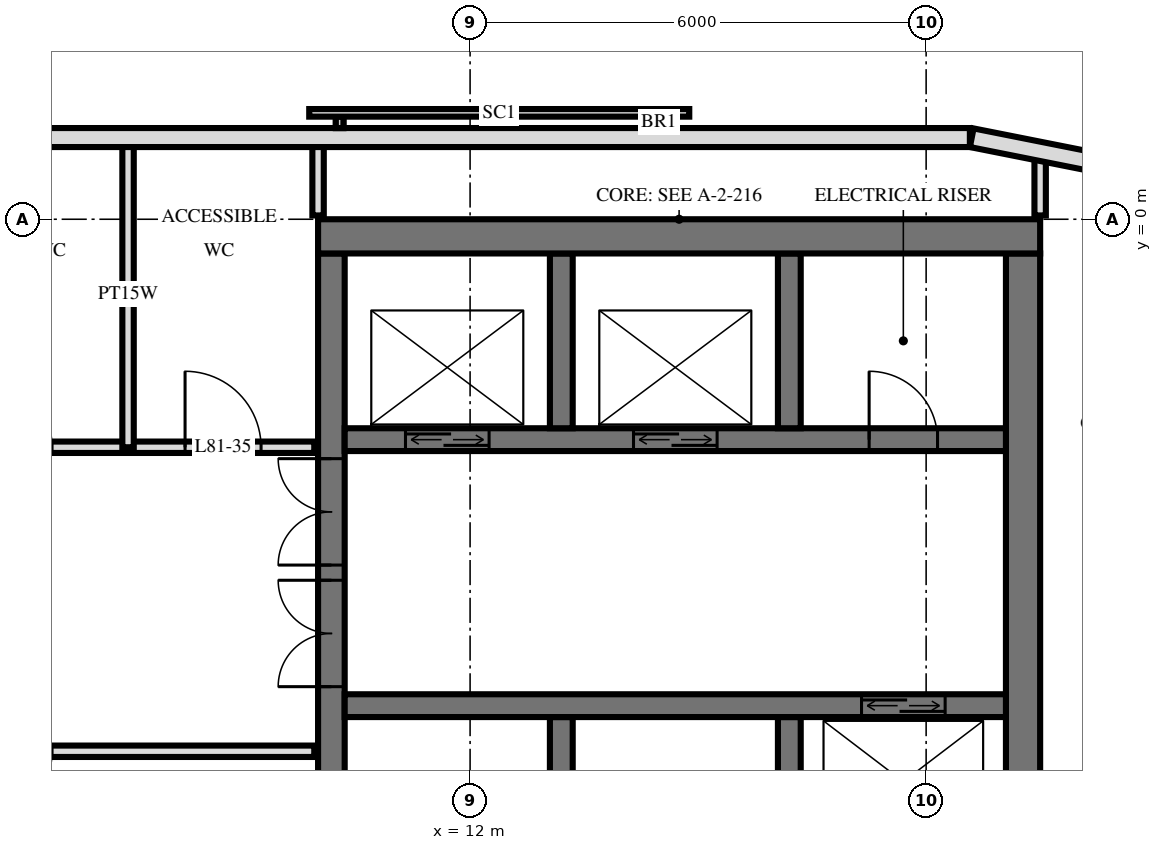
"""IFC4 building model, lengths in metres.
Left out: names, types, materials, properties, quantities, classifications, styles, units other than length and angle.
Written with IfcOpenShell. Run it as: python <this file> out.ifc"""

import sys

from ifc_helpers import new_model, si_unit, direction, frame, frame_2d, origin, place, context, subcontext, project, spatial, rectangle, extrude, element, fill, save


model = new_model("IFC4")
c1 = context("Model", 3, precision=1e-05, world=origin(), true_north=direction((0.0, 1.0)))
c2 = subcontext(c1, "Body", "Model", "MODEL_VIEW")
j1 = project(units=[si_unit("LENGTHUNIT", "METRE"), si_unit("PLANEANGLEUNIT", "RADIAN")], contexts=[c1])
p1 = place(None, origin())
s1 = spatial("IfcSite", under=j1, at=p1, CompositionType="ELEMENT")
p2 = place(p1, origin())
s2 = spatial("IfcBuilding", under=s1, at=p2, CompositionType="ELEMENT")
p3 = place(p2, frame((0.0, 0.0, 305.1)))
s3 = spatial("IfcBuildingStorey", under=s2, at=p3, CompositionType="ELEMENT", Elevation=305.1)
p4 = place(p3, frame((10.0, -0.225, 0.0), z_axis=(0.0, 0.0, 1.0), x_axis=(1.0, 0.0, 0.0)))
e1 = element("IfcWall", 1, at=p4, inside=s3, PredefinedType="SHEAR", context=c2, shape_type="SweptSolid", body=[
    extrude(rectangle(XDim=9.5, YDim=0.45, at=frame_2d((4.75, 0.0))), origin(), (0.0, 0.0, 1.0), 3.5),
])
p5 = place(p3, frame((10.175, -14.55, 0.0), z_axis=(0.0, 0.0, 1.0), x_axis=(0.0, 1.0, 0.0)))
e2 = element("IfcWall", 2, at=p5, inside=s3, PredefinedType="SHEAR", context=c2, shape_type="SweptSolid", body=[
    extrude(rectangle(XDim=14.1, YDim=0.35, at=frame_2d((7.05, 0.0))), origin(), (0.0, 0.0, 1.0), 3.5),
])
p6 = place(p5, frame((8.4, 0.0, 0.0)))
e3 = element("IfcOpeningElement", 3, at=p6, cuts=e2, PredefinedType="OPENING", context=c2, shape_type="SweptSolid", body=[
    extrude(rectangle(XDim=1.4, YDim=2.4, at=frame_2d((0.7, 1.2))), frame((0.0, 0.185, 0.0), z_axis=(0.0, -1.0, 0.0), x_axis=(1.0, 0.0, 0.0)), (0.0, 0.0, 1.0), 0.37),
])
p7 = place(p5, frame((10.0, 0.0, 0.0)))
e4 = element("IfcOpeningElement", 4, at=p7, cuts=e2, PredefinedType="OPENING", context=c2, shape_type="SweptSolid", body=[
    extrude(rectangle(XDim=1.4, YDim=2.4, at=frame_2d((0.7, 1.2))), frame((0.0, 0.185, 0.0), z_axis=(0.0, -1.0, 0.0), x_axis=(1.0, 0.0, 0.0)), (0.0, 0.0, 1.0), 0.37),
])
p8 = place(p5, frame((4.0, 0.0, 0.0)))
e5 = element("IfcOpeningElement", 5, at=p8, cuts=e2, PredefinedType="OPENING", context=c2, shape_type="SweptSolid", body=[
    extrude(rectangle(XDim=1.2, YDim=2.1, at=frame_2d((0.6, 1.05))), frame((0.0, 0.185, 0.0), z_axis=(0.0, -1.0, 0.0), x_axis=(1.0, 0.0, 0.0)), (0.0, 0.0, 1.0), 0.37),
])
p9 = place(p3, frame((19.275, -14.55, 0.0), z_axis=(0.0, 0.0, 1.0), x_axis=(0.0, 1.0, 0.0)))
e6 = element("IfcWall", 6, at=p9, inside=s3, PredefinedType="SHEAR", context=c2, shape_type="SweptSolid", body=[
    extrude(rectangle(XDim=14.1, YDim=0.45, at=frame_2d((7.05, 0.0))), origin(), (0.0, 0.0, 1.0), 3.5),
])
p10 = place(p3, frame((10.35, -2.9, 0.0), z_axis=(0.0, 0.0, 1.0), x_axis=(1.0, 0.0, 0.0)))
e7 = element("IfcWall", 7, at=p10, inside=s3, PredefinedType="SHEAR", context=c2, shape_type="SweptSolid", body=[
    extrude(rectangle(XDim=8.7, YDim=0.3, at=frame_2d((4.35, 0.0))), origin(), (0.0, 0.0, 1.0), 3.5),
])
p11 = place(p10, frame((0.8, 0.0, 0.0)))
e8 = element("IfcOpeningElement", 8, at=p11, cuts=e7, PredefinedType="OPENING", context=c2, shape_type="SweptSolid", body=[
    extrude(rectangle(XDim=1.1, YDim=2.1, at=frame_2d((0.55, 1.05))), frame((0.0, 0.16, 0.0), z_axis=(0.0, -1.0, 0.0), x_axis=(1.0, 0.0, 0.0)), (0.0, 0.0, 1.0), 0.32),
])
p12 = place(p10, frame((3.8, 0.0, 0.0)))
e9 = element("IfcOpeningElement", 9, at=p12, cuts=e7, PredefinedType="OPENING", context=c2, shape_type="SweptSolid", body=[
    extrude(rectangle(XDim=1.1, YDim=2.1, at=frame_2d((0.55, 1.05))), frame((0.0, 0.16, 0.0), z_axis=(0.0, -1.0, 0.0), x_axis=(1.0, 0.0, 0.0)), (0.0, 0.0, 1.0), 0.32),
])
p13 = place(p10, frame((6.9, 0.0, 0.0)))
e10 = element("IfcOpeningElement", 10, at=p13, cuts=e7, PredefinedType="OPENING", context=c2, shape_type="SweptSolid", body=[
    extrude(rectangle(XDim=0.9, YDim=2.1, at=frame_2d((0.45, 1.05))), frame((0.0, 0.16, 0.0), z_axis=(0.0, -1.0, 0.0), x_axis=(1.0, 0.0, 0.0)), (0.0, 0.0, 1.0), 0.32),
])
p14 = place(p3, frame((10.35, -6.4, 0.0), z_axis=(0.0, 0.0, 1.0), x_axis=(1.0, 0.0, 0.0)))
e11 = element("IfcWall", 11, at=p14, inside=s3, PredefinedType="SHEAR", context=c2, shape_type="SweptSolid", body=[
    extrude(rectangle(XDim=8.7, YDim=0.3, at=frame_2d((4.35, 0.0))), origin(), (0.0, 0.0, 1.0), 3.5),
])
p15 = place(p14, frame((6.8, 0.0, 0.0)))
e12 = element("IfcOpeningElement", 12, at=p15, cuts=e11, PredefinedType="OPENING", context=c2, shape_type="SweptSolid", body=[
    extrude(rectangle(XDim=1.1, YDim=2.1, at=frame_2d((0.55, 1.05))), frame((0.0, 0.16, 0.0), z_axis=(0.0, -1.0, 0.0), x_axis=(1.0, 0.0, 0.0)), (0.0, 0.0, 1.0), 0.32),
])
for number, where, z_axis, x_axis in (
    (13, (13.2, -2.75, 0.0), (0.0, 0.0, 1.0), (0.0, 1.0, 0.0)),
    (14, (13.2, -8.85, 0.0), (0.0, 0.0, 1.0), (0.0, 1.0, 0.0)),
    (15, (16.2, -2.75, 0.0), (0.0, 0.0, 1.0), (0.0, 1.0, 0.0)),
    (16, (16.2, -8.85, 0.0), (0.0, 0.0, 1.0), (0.0, 1.0, 0.0)),
):
    element("IfcWall", number, at=place(p3, frame(where, z_axis=z_axis, x_axis=x_axis)), inside=s3, PredefinedType="SHEAR", context=c2, shape_type="SweptSolid", body=[
        extrude(rectangle(XDim=2.3, YDim=0.3, at=frame_2d((1.15, 0.0))), origin(), (0.0, 0.0, 1.0), 3.5),
    ])
p16 = place(p3, frame((20.249, 0.745, 0.0), z_axis=(0.0, 0.0, 1.0), x_axis=(-0.980797896849, 0.195026884138, 0.0)))
e17 = element("IfcWall", 17, at=p16, inside=s3, PredefinedType="SOLIDWALL", context=c2, shape_type="SweptSolid", body=[
    extrude(rectangle(XDim=1.681, YDim=0.25, at=frame_2d((0.841, 0.0))), origin(), (0.0, 0.0, 1.0), 3.2),
])
p17 = place(p3, frame((18.575, 1.075, 0.0), z_axis=(0.0, 0.0, 1.0), x_axis=(-1.0, 0.0, 0.0)))
e18 = element("IfcWall", 18, at=p17, inside=s3, PredefinedType="SOLIDWALL", context=c2, shape_type="SweptSolid", body=[
    extrude(rectangle(XDim=37.151, YDim=0.25, at=frame_2d((18.575, 0.0))), origin(), (0.0, 0.0, 1.0), 3.2),
])
p18 = place(p17, frame((15.275, 0.0, 0.9)))
e19 = element("IfcOpeningElement", 19, at=p18, cuts=e18, PredefinedType="OPENING", context=c2, shape_type="SweptSolid", body=[
    extrude(rectangle(XDim=2.4, YDim=1.5, at=frame_2d((1.2, 0.75))), frame((0.0, 0.135, 0.0), z_axis=(0.0, -1.0, 0.0), x_axis=(1.0, 0.0, 0.0)), (0.0, 0.0, 1.0), 0.27),
])
p19 = place(p17, frame((19.625, 0.0, 0.9)))
e20 = element("IfcOpeningElement", 20, at=p19, cuts=e18, PredefinedType="OPENING", context=c2, shape_type="SweptSolid", body=[
    extrude(rectangle(XDim=2.4, YDim=1.5, at=frame_2d((1.2, 0.75))), frame((0.0, 0.135, 0.0), z_axis=(0.0, -1.0, 0.0), x_axis=(1.0, 0.0, 0.0)), (0.0, 0.0, 1.0), 0.27),
])
p20 = place(p17, frame((24.275, 0.0, 0.9)))
e21 = element("IfcOpeningElement", 21, at=p20, cuts=e18, PredefinedType="OPENING", context=c2, shape_type="SweptSolid", body=[
    extrude(rectangle(XDim=2.4, YDim=1.5, at=frame_2d((1.2, 0.75))), frame((0.0, 0.135, 0.0), z_axis=(0.0, -1.0, 0.0), x_axis=(1.0, 0.0, 0.0)), (0.0, 0.0, 1.0), 0.27),
])
p21 = place(p3, frame((19.5, 0.05, 0.0), z_axis=(0.0, 0.0, 1.0), x_axis=(0.0, 1.0, 0.0)))
e22 = element("IfcWall", 22, at=p21, inside=s3, PredefinedType="PARTITIONING", context=c2, shape_type="SweptSolid", body=[
    extrude(rectangle(XDim=0.787, YDim=0.15, at=frame_2d((0.394, 0.0))), origin(), (0.0, 0.0, 1.0), 3.22),
])
p22 = place(p3, frame((10.0, 0.05, 0.0), z_axis=(0.0, 0.0, 1.0), x_axis=(0.0, 1.0, 0.0)))
e23 = element("IfcWall", 23, at=p22, inside=s3, PredefinedType="PLUMBINGWALL", context=c2, shape_type="SweptSolid", body=[
    extrude(rectangle(XDim=0.97, YDim=0.15, at=frame_2d((0.485, 0.0))), origin(), (0.0, 0.0, 1.0), 3.22),
])
p23 = place(p3, frame((7.5, -3.0, 0.0), z_axis=(0.0, 0.0, 1.0), x_axis=(0.0, 1.0, 0.0)))
e24 = element("IfcWall", 24, at=p23, inside=s3, PredefinedType="PLUMBINGWALL", context=c2, shape_type="SweptSolid", body=[
    extrude(rectangle(XDim=4.02, YDim=0.15, at=frame_2d((2.01, 0.0))), origin(), (0.0, 0.0, 1.0), 3.22),
])
p24 = place(p3, frame((-9.95, -7.0, 0.0), z_axis=(0.0, 0.0, 1.0), x_axis=(1.0, 0.0, 0.0)))
e25 = element("IfcWall", 25, at=p24, inside=s3, PredefinedType="PARTITIONING", context=c2, shape_type="SweptSolid", body=[
    extrude(rectangle(XDim=19.9, YDim=0.15, at=frame_2d((9.95, 0.0))), origin(), (0.0, 0.0, 1.0), 3.22),
])
p25 = place(p24, frame((9.45, 0.0, 0.0)))
e26 = element("IfcOpeningElement", 26, at=p25, cuts=e25, PredefinedType="OPENING", context=c2, shape_type="SweptSolid", body=[
    extrude(rectangle(XDim=1.0, YDim=2.1, at=frame_2d((0.5, 1.05))), frame((0.0, 0.085, 0.0), z_axis=(0.0, -1.0, 0.0), x_axis=(1.0, 0.0, 0.0)), (0.0, 0.0, 1.0), 0.17),
])
p26 = place(p24, frame((15.45, 0.0, 0.0)))
e27 = element("IfcOpeningElement", 27, at=p26, cuts=e25, PredefinedType="OPENING", context=c2, shape_type="SweptSolid", body=[
    extrude(rectangle(XDim=1.0, YDim=2.1, at=frame_2d((0.5, 1.05))), frame((0.0, 0.085, 0.0), z_axis=(0.0, -1.0, 0.0), x_axis=(1.0, 0.0, 0.0)), (0.0, 0.0, 1.0), 0.17),
])
p27 = place(p3, frame((-9.95, -3.0, 0.0), z_axis=(0.0, 0.0, 1.0), x_axis=(1.0, 0.0, 0.0)))
e28 = element("IfcWall", 28, at=p27, inside=s3, PredefinedType="PARTITIONING", context=c2, shape_type="SweptSolid", body=[
    extrude(rectangle(XDim=19.9, YDim=0.15, at=frame_2d((9.95, 0.0))), origin(), (0.0, 0.0, 1.0), 3.22),
])
p28 = place(p27, frame((2.2, 0.0, 0.0)))
e29 = element("IfcOpeningElement", 29, at=p28, cuts=e28, PredefinedType="OPENING", context=c2, shape_type="SweptSolid", body=[
    extrude(rectangle(XDim=1.0, YDim=2.1, at=frame_2d((0.5, 1.05))), frame((0.0, 0.085, 0.0), z_axis=(0.0, -1.0, 0.0), x_axis=(1.0, 0.0, 0.0)), (0.0, 0.0, 1.0), 0.17),
])
p29 = place(p27, frame((7.2, 0.0, 0.0)))
e30 = element("IfcOpeningElement", 30, at=p29, cuts=e28, PredefinedType="OPENING", context=c2, shape_type="SweptSolid", body=[
    extrude(rectangle(XDim=1.0, YDim=2.1, at=frame_2d((0.5, 1.05))), frame((0.0, 0.085, 0.0), z_axis=(0.0, -1.0, 0.0), x_axis=(1.0, 0.0, 0.0)), (0.0, 0.0, 1.0), 0.17),
])
p30 = place(p27, frame((11.7, 0.0, 0.0)))
e31 = element("IfcOpeningElement", 31, at=p30, cuts=e28, PredefinedType="OPENING", context=c2, shape_type="SweptSolid", body=[
    extrude(rectangle(XDim=1.0, YDim=2.1, at=frame_2d((0.5, 1.05))), frame((0.0, 0.085, 0.0), z_axis=(0.0, -1.0, 0.0), x_axis=(1.0, 0.0, 0.0)), (0.0, 0.0, 1.0), 0.17),
])
p31 = place(p27, frame((15.45, 0.0, 0.0)))
e32 = element("IfcOpeningElement", 32, at=p31, cuts=e28, PredefinedType="OPENING", context=c2, shape_type="SweptSolid", body=[
    extrude(rectangle(XDim=1.0, YDim=2.1, at=frame_2d((0.5, 1.05))), frame((0.0, 0.085, 0.0), z_axis=(0.0, -1.0, 0.0), x_axis=(1.0, 0.0, 0.0)), (0.0, 0.0, 1.0), 0.17),
])
p32 = place(p27, frame((18.2, 0.0, 0.0)))
e33 = element("IfcOpeningElement", 33, at=p32, cuts=e28, PredefinedType="OPENING", context=c2, shape_type="SweptSolid", body=[
    extrude(rectangle(XDim=1.0, YDim=2.1, at=frame_2d((0.5, 1.05))), frame((0.0, 0.085, 0.0), z_axis=(0.0, -1.0, 0.0), x_axis=(1.0, 0.0, 0.0)), (0.0, 0.0, 1.0), 0.17),
])
p33 = place(p11, origin())
e34 = element("IfcDoor", 34, at=p33, inside=s3, OperationType="DOUBLE_DOOR_SLIDING", PredefinedType="USERDEFINED", context=c2, shape_type="SweptSolid", body=[
    extrude(rectangle(XDim=1.1, YDim=2.1, at=frame_2d((0.55, 1.05))), frame((0.0, 0.025, 0.0), z_axis=(0.0, -1.0, 0.0), x_axis=(1.0, 0.0, 0.0)), (0.0, 0.0, 1.0), 0.05),
])
fill(e8, e34)
p34 = place(p12, origin())
e35 = element("IfcDoor", 35, at=p34, inside=s3, OperationType="DOUBLE_DOOR_SLIDING", PredefinedType="USERDEFINED", context=c2, shape_type="SweptSolid", body=[
    extrude(rectangle(XDim=1.1, YDim=2.1, at=frame_2d((0.55, 1.05))), frame((0.0, 0.025, 0.0), z_axis=(0.0, -1.0, 0.0), x_axis=(1.0, 0.0, 0.0)), (0.0, 0.0, 1.0), 0.05),
])
fill(e9, e35)
p35 = place(p15, origin())
e36 = element("IfcDoor", 36, at=p35, inside=s3, OperationType="DOUBLE_DOOR_SLIDING", PredefinedType="USERDEFINED", context=c2, shape_type="SweptSolid", body=[
    extrude(rectangle(XDim=1.1, YDim=2.1, at=frame_2d((0.55, 1.05))), frame((0.0, 0.025, 0.0), z_axis=(0.0, -1.0, 0.0), x_axis=(1.0, 0.0, 0.0)), (0.0, 0.0, 1.0), 0.05),
])
fill(e12, e36)
p36 = place(p6, origin())
e37 = element("IfcDoor", 37, at=p36, inside=s3, OperationType="DOUBLE_DOOR_SINGLE_SWING", PredefinedType="DOOR", context=c2, shape_type="SweptSolid", body=[
    extrude(rectangle(XDim=1.4, YDim=2.4, at=frame_2d((0.7, 1.2))), frame((0.0, 0.025, 0.0), z_axis=(0.0, -1.0, 0.0), x_axis=(1.0, 0.0, 0.0)), (0.0, 0.0, 1.0), 0.05),
])
fill(e3, e37)
p37 = place(p7, origin())
e38 = element("IfcDoor", 38, at=p37, inside=s3, OperationType="DOUBLE_DOOR_SINGLE_SWING", PredefinedType="DOOR", context=c2, shape_type="SweptSolid", body=[
    extrude(rectangle(XDim=1.4, YDim=2.4, at=frame_2d((0.7, 1.2))), frame((0.0, 0.025, 0.0), z_axis=(0.0, -1.0, 0.0), x_axis=(1.0, 0.0, 0.0)), (0.0, 0.0, 1.0), 0.05),
])
fill(e4, e38)
p38 = place(p13, origin())
e39 = element("IfcDoor", 39, at=p38, inside=s3, OperationType="SINGLE_SWING_RIGHT", PredefinedType="DOOR", context=c2, shape_type="SweptSolid", body=[
    extrude(rectangle(XDim=0.9, YDim=2.1, at=frame_2d((0.45, 1.05))), frame((0.0, 0.025, 0.0), z_axis=(0.0, -1.0, 0.0), x_axis=(1.0, 0.0, 0.0)), (0.0, 0.0, 1.0), 0.05),
])
fill(e10, e39)
p39 = place(p32, origin())
e40 = element("IfcDoor", 40, at=p39, inside=s3, OperationType="SINGLE_SWING_RIGHT", PredefinedType="DOOR", context=c2, shape_type="SweptSolid", body=[
    extrude(rectangle(XDim=1.0, YDim=2.1, at=frame_2d((0.5, 1.05))), frame((0.0, 0.025, 0.0), z_axis=(0.0, -1.0, 0.0), x_axis=(1.0, 0.0, 0.0)), (0.0, 0.0, 1.0), 0.05),
])
fill(e33, e40)
save(model, sys.argv[1])
